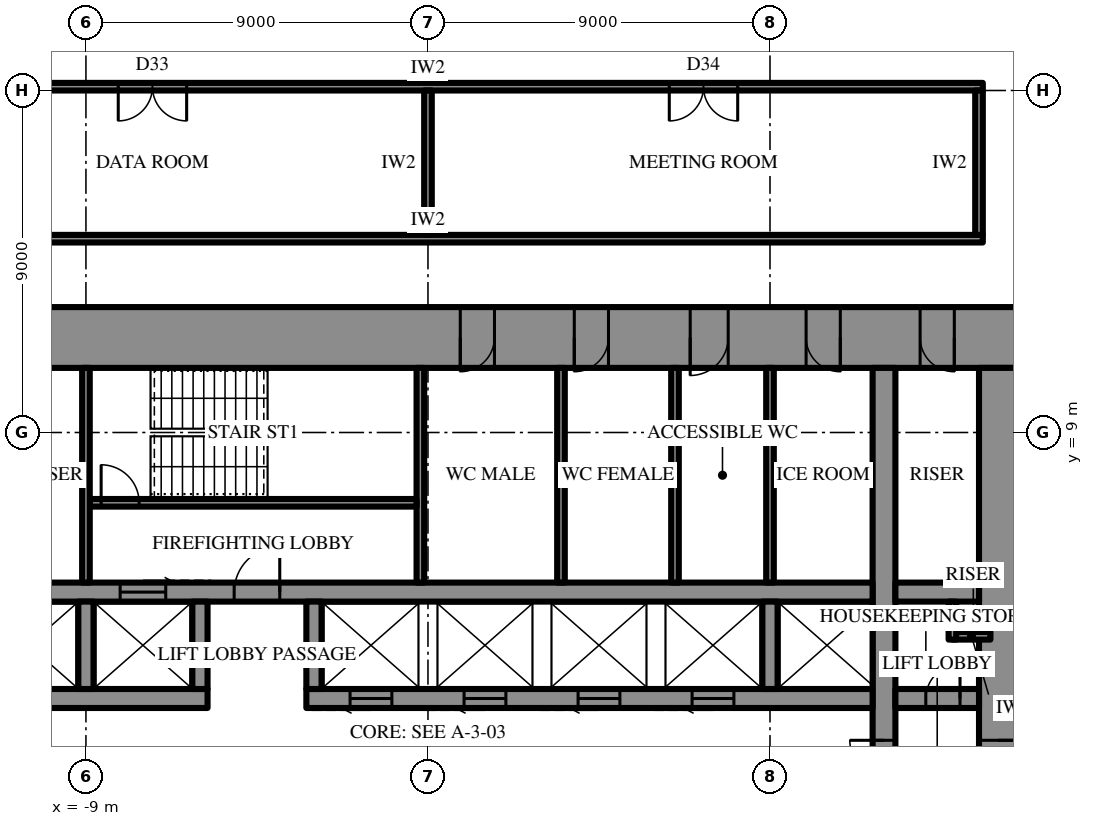
"""IFC4 building model, lengths in metres.
Left out: names, types, materials, properties, quantities, classifications, styles, units other than length and angle.
Written with IfcOpenShell. Run it as: python <this file> out.ifc"""

import sys

from ifc_helpers import new_model, si_unit, direction, frame, frame_2d, origin, place, context, subcontext, project, spatial, rectangle, extrude, element, fill, save


model = new_model("IFC4")
c1 = context("Model", 3, precision=1e-05, world=origin(), true_north=direction((0.0, 1.0)))
c2 = subcontext(c1, "Body", "Model", "MODEL_VIEW")
j1 = project(units=[si_unit("LENGTHUNIT", "METRE"), si_unit("PLANEANGLEUNIT", "RADIAN")], contexts=[c1])
p1 = place(None, origin())
s1 = spatial("IfcSite", under=j1, at=p1, CompositionType="ELEMENT")
p2 = place(p1, origin())
s2 = spatial("IfcBuilding", under=s1, at=p2, CompositionType="ELEMENT")
p3 = place(p2, frame((0.0, 0.0, 278.5)))
s3 = spatial("IfcBuildingStorey", under=s2, at=p3, CompositionType="ELEMENT", Elevation=278.5)
p4 = place(p3, frame((-15.5, 11.5, 0.0), z_axis=(0.0, 0.0, 1.0), x_axis=(1.0, 0.0, 0.0)))
e1 = element("IfcWall", 1, at=p4, inside=s3, PredefinedType="SHEAR", context=c2, shape_type="SweptSolid", body=[
    extrude(rectangle(XDim=31.0, YDim=1.6, at=frame_2d((15.5, 0.0))), origin(), (0.0, 0.0, 1.0), 4.2),
])
p5 = place(p4, frame((16.35, 0.0, 0.0)))
e2 = element("IfcOpeningElement", 2, at=p5, cuts=e1, PredefinedType="OPENING", context=c2, shape_type="SweptSolid", body=[
    extrude(rectangle(XDim=0.9, YDim=2.2, at=frame_2d((0.45, 1.1))), frame((0.0, 0.81, 0.0), z_axis=(0.0, -1.0, 0.0), x_axis=(1.0, 0.0, 0.0)), (0.0, 0.0, 1.0), 1.62),
])
p6 = place(p4, frame((19.35, 0.0, 0.0)))
e3 = element("IfcOpeningElement", 3, at=p6, cuts=e1, PredefinedType="OPENING", context=c2, shape_type="SweptSolid", body=[
    extrude(rectangle(XDim=0.9, YDim=2.2, at=frame_2d((0.45, 1.1))), frame((0.0, 0.81, 0.0), z_axis=(0.0, -1.0, 0.0), x_axis=(1.0, 0.0, 0.0)), (0.0, 0.0, 1.0), 1.62),
])
p7 = place(p4, frame((22.4, 0.0, 0.0)))
e4 = element("IfcOpeningElement", 4, at=p7, cuts=e1, PredefinedType="OPENING", context=c2, shape_type="SweptSolid", body=[
    extrude(rectangle(XDim=1.0, YDim=2.2, at=frame_2d((0.5, 1.1))), frame((0.0, 0.81, 0.0), z_axis=(0.0, -1.0, 0.0), x_axis=(1.0, 0.0, 0.0)), (0.0, 0.0, 1.0), 1.62),
])
p8 = place(p4, frame((1.65, 0.0, 0.0)))
e5 = element("IfcOpeningElement", 5, at=p8, cuts=e1, PredefinedType="OPENING", context=c2, shape_type="SweptSolid", body=[
    extrude(rectangle(XDim=0.9, YDim=2.2, at=frame_2d((0.45, 1.1))), frame((0.0, 0.81, 0.0), z_axis=(0.0, -1.0, 0.0), x_axis=(1.0, 0.0, 0.0)), (0.0, 0.0, 1.0), 1.62),
])
p9 = place(p4, frame((4.65, 0.0, 0.0)))
e6 = element("IfcOpeningElement", 6, at=p9, cuts=e1, PredefinedType="OPENING", context=c2, shape_type="SweptSolid", body=[
    extrude(rectangle(XDim=0.9, YDim=2.2, at=frame_2d((0.45, 1.1))), frame((0.0, 0.81, 0.0), z_axis=(0.0, -1.0, 0.0), x_axis=(1.0, 0.0, 0.0)), (0.0, 0.0, 1.0), 1.62),
])
p10 = place(p4, frame((25.45, 0.0, 0.0)))
e7 = element("IfcOpeningElement", 7, at=p10, cuts=e1, PredefinedType="OPENING", context=c2, shape_type="SweptSolid", body=[
    extrude(rectangle(XDim=0.9, YDim=2.2, at=frame_2d((0.45, 1.1))), frame((0.0, 0.81, 0.0), z_axis=(0.0, -1.0, 0.0), x_axis=(1.0, 0.0, 0.0)), (0.0, 0.0, 1.0), 1.62),
])
p11 = place(p4, frame((28.45, 0.0, 0.0)))
e8 = element("IfcOpeningElement", 8, at=p11, cuts=e1, PredefinedType="OPENING", context=c2, shape_type="SweptSolid", body=[
    extrude(rectangle(XDim=0.9, YDim=2.2, at=frame_2d((0.45, 1.1))), frame((0.0, 0.81, 0.0), z_axis=(0.0, -1.0, 0.0), x_axis=(1.0, 0.0, 0.0)), (0.0, 0.0, 1.0), 1.62),
])
p12 = place(p3, frame((15.0, -10.7, 0.0), z_axis=(0.0, 0.0, 1.0), x_axis=(0.0, 1.0, 0.0)))
e9 = element("IfcWall", 9, at=p12, inside=s3, PredefinedType="SHEAR", context=c2, shape_type="SweptSolid", body=[
    extrude(rectangle(XDim=21.4, YDim=1.0, at=frame_2d((10.7, 0.0))), origin(), (0.0, 0.0, 1.0), 4.2),
])
p13 = place(p12, frame((9.8, 0.0, 0.0)))
e10 = element("IfcOpeningElement", 10, at=p13, cuts=e9, PredefinedType="OPENING", context=c2, shape_type="SweptSolid", body=[
    extrude(rectangle(XDim=1.8, YDim=2.4, at=frame_2d((0.9, 1.2))), frame((0.0, 0.51, 0.0), z_axis=(0.0, -1.0, 0.0), x_axis=(1.0, 0.0, 0.0)), (0.0, 0.0, 1.0), 1.02),
])
p14 = place(p3, frame((12.0, -10.7, 0.0), z_axis=(0.0, 0.0, 1.0), x_axis=(0.0, 1.0, 0.0)))
e11 = element("IfcWall", 11, at=p14, inside=s3, PredefinedType="SHEAR", context=c2, shape_type="SweptSolid", body=[
    extrude(rectangle(XDim=21.4, YDim=0.6, at=frame_2d((10.7, 0.0))), origin(), (0.0, 0.0, 1.0), 4.2),
])
p15 = place(p14, frame((9.8, 0.0, 0.0)))
e12 = element("IfcOpeningElement", 12, at=p15, cuts=e11, PredefinedType="OPENING", context=c2, shape_type="SweptSolid", body=[
    extrude(rectangle(XDim=1.8, YDim=2.4, at=frame_2d((0.9, 1.2))), frame((0.0, 0.31, 0.0), z_axis=(0.0, -1.0, 0.0), x_axis=(1.0, 0.0, 0.0)), (0.0, 0.0, 1.0), 0.62),
])
p16 = place(p3, frame((-11.7, 2.0, 0.0), z_axis=(0.0, 0.0, 1.0), x_axis=(1.0, 0.0, 0.0)))
e13 = element("IfcWall", 13, at=p16, inside=s3, PredefinedType="SHEAR", context=c2, shape_type="SweptSolid", body=[
    extrude(rectangle(XDim=5.9, YDim=0.5, at=frame_2d((2.95, 0.0))), origin(), (0.0, 0.0, 1.0), 4.2),
])
p17 = place(p3, frame((-3.2, 2.0, 0.0), z_axis=(0.0, 0.0, 1.0), x_axis=(1.0, 0.0, 0.0)))
e14 = element("IfcWall", 14, at=p17, inside=s3, PredefinedType="SHEAR", context=c2, shape_type="SweptSolid", body=[
    extrude(rectangle(XDim=14.9, YDim=0.5, at=frame_2d((7.45, 0.0))), origin(), (0.0, 0.0, 1.0), 4.2),
])
p18 = place(p17, frame((1.15, 0.0, 0.0)))
e15 = element("IfcOpeningElement", 15, at=p18, cuts=e14, PredefinedType="OPENING", context=c2, shape_type="SweptSolid", body=[
    extrude(rectangle(XDim=1.1, YDim=2.2, at=frame_2d((0.55, 1.1))), frame((0.0, 0.26, 0.0), z_axis=(0.0, -1.0, 0.0), x_axis=(1.0, 0.0, 0.0)), (0.0, 0.0, 1.0), 0.52),
])
p19 = place(p17, frame((4.15, 0.0, 0.0)))
e16 = element("IfcOpeningElement", 16, at=p19, cuts=e14, PredefinedType="OPENING", context=c2, shape_type="SweptSolid", body=[
    extrude(rectangle(XDim=1.1, YDim=2.2, at=frame_2d((0.55, 1.1))), frame((0.0, 0.26, 0.0), z_axis=(0.0, -1.0, 0.0), x_axis=(1.0, 0.0, 0.0)), (0.0, 0.0, 1.0), 0.52),
])
p20 = place(p17, frame((7.15, 0.0, 0.0)))
e17 = element("IfcOpeningElement", 17, at=p20, cuts=e14, PredefinedType="OPENING", context=c2, shape_type="SweptSolid", body=[
    extrude(rectangle(XDim=1.1, YDim=2.2, at=frame_2d((0.55, 1.1))), frame((0.0, 0.26, 0.0), z_axis=(0.0, -1.0, 0.0), x_axis=(1.0, 0.0, 0.0)), (0.0, 0.0, 1.0), 0.52),
])
p21 = place(p17, frame((10.15, 0.0, 0.0)))
e18 = element("IfcOpeningElement", 18, at=p21, cuts=e14, PredefinedType="OPENING", context=c2, shape_type="SweptSolid", body=[
    extrude(rectangle(XDim=1.1, YDim=2.2, at=frame_2d((0.55, 1.1))), frame((0.0, 0.26, 0.0), z_axis=(0.0, -1.0, 0.0), x_axis=(1.0, 0.0, 0.0)), (0.0, 0.0, 1.0), 0.52),
])
p22 = place(p3, frame((12.3, 2.0, 0.0), z_axis=(0.0, 0.0, 1.0), x_axis=(1.0, 0.0, 0.0)))
e19 = element("IfcWall", 19, at=p22, inside=s3, PredefinedType="SHEAR", context=c2, shape_type="SweptSolid", body=[
    extrude(rectangle(XDim=2.2, YDim=0.5, at=frame_2d((1.1, 0.0))), origin(), (0.0, 0.0, 1.0), 4.2),
])
p23 = place(p22, frame((0.8, 0.0, 0.0)))
e20 = element("IfcOpeningElement", 20, at=p23, cuts=e19, PredefinedType="OPENING", context=c2, shape_type="SweptSolid", body=[
    extrude(rectangle(XDim=0.9, YDim=2.2, at=frame_2d((0.45, 1.1))), frame((0.0, 0.26, 0.0), z_axis=(0.0, -1.0, 0.0), x_axis=(1.0, 0.0, 0.0)), (0.0, 0.0, 1.0), 0.52),
])
p24 = place(p3, frame((-11.7, 4.8, 0.0), z_axis=(0.0, 0.0, 1.0), x_axis=(1.0, 0.0, 0.0)))
e21 = element("IfcWall", 21, at=p24, inside=s3, PredefinedType="SHEAR", context=c2, shape_type="SweptSolid", body=[
    extrude(rectangle(XDim=23.4, YDim=0.5, at=frame_2d((11.7, 0.0))), origin(), (0.0, 0.0, 1.0), 4.2),
])
p25 = place(p24, frame((6.6, 0.0, 0.0)))
e22 = element("IfcOpeningElement", 22, at=p25, cuts=e21, PredefinedType="OPENING", context=c2, shape_type="SweptSolid", body=[
    extrude(rectangle(XDim=1.2, YDim=2.2, at=frame_2d((0.6, 1.1))), frame((0.0, 0.26, 0.0), z_axis=(0.0, -1.0, 0.0), x_axis=(1.0, 0.0, 0.0)), (0.0, 0.0, 1.0), 0.52),
])
p26 = place(p24, frame((3.6, 0.0, 0.0)))
e23 = element("IfcOpeningElement", 23, at=p26, cuts=e21, PredefinedType="OPENING", context=c2, shape_type="SweptSolid", body=[
    extrude(rectangle(XDim=1.2, YDim=2.2, at=frame_2d((0.6, 1.1))), frame((0.0, 0.26, 0.0), z_axis=(0.0, -1.0, 0.0), x_axis=(1.0, 0.0, 0.0)), (0.0, 0.0, 1.0), 0.52),
])
p27 = place(p3, frame((12.3, 4.8, 0.0), z_axis=(0.0, 0.0, 1.0), x_axis=(1.0, 0.0, 0.0)))
e24 = element("IfcWall", 24, at=p27, inside=s3, PredefinedType="SHEAR", context=c2, shape_type="SweptSolid", body=[
    extrude(rectangle(XDim=2.2, YDim=0.5, at=frame_2d((1.1, 0.0))), origin(), (0.0, 0.0, 1.0), 4.2),
])
for number, where, z_axis, x_axis in (
    (25, (-9.0, 2.25, 0.0), (0.0, 0.0, 1.0), (0.0, 1.0, 0.0)),
    (26, (-6.0, 2.25, 0.0), (0.0, 0.0, 1.0), (0.0, 1.0, 0.0)),
    (27, (-3.0, 2.25, 0.0), (0.0, 0.0, 1.0), (0.0, 1.0, 0.0)),
    (28, (9.0, 2.25, 0.0), (0.0, 0.0, 1.0), (0.0, 1.0, 0.0)),
):
    element("IfcWall", number, at=place(p3, frame(where, z_axis=z_axis, x_axis=x_axis)), inside=s3, PredefinedType="SHEAR", context=c2, shape_type="SweptSolid", body=[
        extrude(rectangle(XDim=2.3, YDim=0.4, at=frame_2d((1.15, 0.0))), origin(), (0.0, 0.0, 1.0), 4.2),
    ])
p28 = place(p3, frame((-0.2, 5.05, 0.0), z_axis=(0.0, 0.0, 1.0), x_axis=(0.0, 1.0, 0.0)))
e29 = element("IfcWall", 29, at=p28, inside=s3, PredefinedType="SHEAR", context=c2, shape_type="SweptSolid", body=[
    extrude(rectangle(XDim=5.65, YDim=0.2, at=frame_2d((2.825, 0.0))), origin(), (0.0, 0.0, 1.0), 4.2),
])
p29 = place(p3, frame((-8.9, 7.15, 0.0), z_axis=(0.0, 0.0, 1.0), x_axis=(1.0, 0.0, 0.0)))
e30 = element("IfcWall", 30, at=p29, inside=s3, PredefinedType="SHEAR", context=c2, shape_type="SweptSolid", body=[
    extrude(rectangle(XDim=8.6, YDim=0.2, at=frame_2d((4.3, 0.0))), origin(), (0.0, 0.0, 1.0), 4.2),
])
p30 = place(p29, frame((0.3, 0.0, 0.0)))
e31 = element("IfcOpeningElement", 31, at=p30, cuts=e30, PredefinedType="OPENING", context=c2, shape_type="SweptSolid", body=[
    extrude(rectangle(XDim=1.0, YDim=2.2, at=frame_2d((0.5, 1.1))), frame((0.0, 0.11, 0.0), z_axis=(0.0, -1.0, 0.0), x_axis=(1.0, 0.0, 0.0)), (0.0, 0.0, 1.0), 0.22),
])
for number, where, z_axis, x_axis in (
    (32, (-9.0, 5.05, 0.0), (0.0, 0.0, 1.0), (0.0, 1.0, 0.0)),
    (33, (9.0, 5.05, 0.0), (0.0, 0.0, 1.0), (0.0, 1.0, 0.0)),
    (34, (3.5, 5.05, 0.0), (0.0, 0.0, 1.0), (0.0, 1.0, 0.0)),
    (35, (6.5, 5.05, 0.0), (0.0, 0.0, 1.0), (0.0, 1.0, 0.0)),
):
    element("IfcWall", number, at=place(p3, frame(where, z_axis=z_axis, x_axis=x_axis)), inside=s3, PredefinedType="PARTITIONING", context=c2, shape_type="SweptSolid", body=[
        extrude(rectangle(XDim=5.65, YDim=0.2, at=frame_2d((2.825, 0.0))), origin(), (0.0, 0.0, 1.0), 4.0),
    ])
for number, where, z_axis, x_axis in (
    (36, (13.8, 3.65, 0.0), (0.0, 0.0, 1.0), (1.0, 0.0, 0.0)),
    (37, (13.8, 3.55, 0.0), (0.0, 0.0, 1.0), (0.0, 1.0, 0.0)),
):
    element("IfcWall", number, at=place(p3, frame(where, z_axis=z_axis, x_axis=x_axis)), inside=s3, PredefinedType="PARTITIONING", context=c2, shape_type="SweptSolid", body=[
        extrude(rectangle(XDim=1.0, YDim=0.2, at=frame_2d((0.5, 0.0))), origin(), (0.0, 0.0, 1.0), 4.0),
    ])
p31 = place(p3, frame((-14.6, 14.1, 0.0), z_axis=(0.0, 0.0, 1.0), x_axis=(1.0, 0.0, 0.0)))
e38 = element("IfcWall", 38, at=p31, inside=s3, PredefinedType="PARTITIONING", context=c2, shape_type="SweptSolid", body=[
    extrude(rectangle(XDim=29.2, YDim=0.2, at=frame_2d((14.6, 0.0))), origin(), (0.0, 0.0, 1.0), 4.0),
])
p32 = place(p3, frame((-14.6, 18.1, 0.0), z_axis=(0.0, 0.0, 1.0), x_axis=(1.0, 0.0, 0.0)))
e39 = element("IfcWall", 39, at=p32, inside=s3, PredefinedType="PARTITIONING", context=c2, shape_type="SweptSolid", body=[
    extrude(rectangle(XDim=29.2, YDim=0.2, at=frame_2d((14.6, 0.0))), origin(), (0.0, 0.0, 1.0), 4.0),
])
p33 = place(p32, frame((6.45, 0.0, 0.0)))
e40 = element("IfcOpeningElement", 40, at=p33, cuts=e39, PredefinedType="OPENING", context=c2, shape_type="SweptSolid", body=[
    extrude(rectangle(XDim=1.8, YDim=2.4, at=frame_2d((0.9, 1.2))), frame((0.0, 0.11, 0.0), z_axis=(0.0, -1.0, 0.0), x_axis=(1.0, 0.0, 0.0)), (0.0, 0.0, 1.0), 0.22),
])
p34 = place(p32, frame((20.95, 0.0, 0.0)))
e41 = element("IfcOpeningElement", 41, at=p34, cuts=e39, PredefinedType="OPENING", context=c2, shape_type="SweptSolid", body=[
    extrude(rectangle(XDim=1.8, YDim=2.4, at=frame_2d((0.9, 1.2))), frame((0.0, 0.11, 0.0), z_axis=(0.0, -1.0, 0.0), x_axis=(1.0, 0.0, 0.0)), (0.0, 0.0, 1.0), 0.22),
])
p35 = place(p3, frame((0.0, 14.2, 0.0), z_axis=(0.0, 0.0, 1.0), x_axis=(0.0, 1.0, 0.0)))
e42 = element("IfcWall", 42, at=p35, inside=s3, PredefinedType="PARTITIONING", context=c2, shape_type="SweptSolid", body=[
    extrude(rectangle(XDim=3.8, YDim=0.2, at=frame_2d((1.9, 0.0))), origin(), (0.0, 0.0, 1.0), 2.992),
])
p36 = place(p3, frame((14.5, 14.2, 0.0), z_axis=(0.0, 0.0, 1.0), x_axis=(0.0, 1.0, 0.0)))
e43 = element("IfcWall", 43, at=p36, inside=s3, PredefinedType="PARTITIONING", context=c2, shape_type="SweptSolid", body=[
    extrude(rectangle(XDim=3.8, YDim=0.2, at=frame_2d((1.9, 0.0))), origin(), (0.0, 0.0, 1.0), 4.0),
])
p37 = place(p13, frame((1.8, 0.0, 0.0), z_axis=(0.0, 0.0, 1.0), x_axis=(-1.0, 0.0, 0.0)))
e44 = element("IfcDoor", 44, at=p37, inside=s3, OperationType="DOUBLE_DOOR_SINGLE_SWING", PredefinedType="DOOR", context=c2, shape_type="SweptSolid", body=[
    extrude(rectangle(XDim=1.8, YDim=2.4, at=frame_2d((0.9, 1.2))), frame((0.0, 0.025, 0.0), z_axis=(0.0, -1.0, 0.0), x_axis=(1.0, 0.0, 0.0)), (0.0, 0.0, 1.0), 0.05),
])
fill(e10, e44)
p38 = place(p25, origin())
e45 = element("IfcDoor", 45, at=p38, inside=s3, OperationType="SINGLE_SWING_LEFT", PredefinedType="DOOR", context=c2, shape_type="SweptSolid", body=[
    extrude(rectangle(XDim=1.2, YDim=2.2, at=frame_2d((0.6, 1.1))), frame((0.0, 0.025, 0.0), z_axis=(0.0, -1.0, 0.0), x_axis=(1.0, 0.0, 0.0)), (0.0, 0.0, 1.0), 0.05),
])
fill(e22, e45)
p39 = place(p30, origin())
e46 = element("IfcDoor", 46, at=p39, inside=s3, OperationType="SINGLE_SWING_RIGHT", PredefinedType="DOOR", context=c2, shape_type="SweptSolid", body=[
    extrude(rectangle(XDim=1.0, YDim=2.2, at=frame_2d((0.5, 1.1))), frame((0.0, 0.025, 0.0), z_axis=(0.0, -1.0, 0.0), x_axis=(1.0, 0.0, 0.0)), (0.0, 0.0, 1.0), 0.05),
])
fill(e31, e46)
p40 = place(p5, frame((0.9, 0.0, 0.0), z_axis=(0.0, 0.0, 1.0), x_axis=(-1.0, 0.0, 0.0)))
e47 = element("IfcDoor", 47, at=p40, inside=s3, OperationType="SINGLE_SWING_LEFT", PredefinedType="DOOR", context=c2, shape_type="SweptSolid", body=[
    extrude(rectangle(XDim=0.9, YDim=2.2, at=frame_2d((0.45, 1.1))), frame((0.0, 0.025, 0.0), z_axis=(0.0, -1.0, 0.0), x_axis=(1.0, 0.0, 0.0)), (0.0, 0.0, 1.0), 0.05),
])
fill(e2, e47)
p41 = place(p6, frame((0.9, 0.0, 0.0), z_axis=(0.0, 0.0, 1.0), x_axis=(-1.0, 0.0, 0.0)))
e48 = element("IfcDoor", 48, at=p41, inside=s3, OperationType="SINGLE_SWING_LEFT", PredefinedType="DOOR", context=c2, shape_type="SweptSolid", body=[
    extrude(rectangle(XDim=0.9, YDim=2.2, at=frame_2d((0.45, 1.1))), frame((0.0, 0.025, 0.0), z_axis=(0.0, -1.0, 0.0), x_axis=(1.0, 0.0, 0.0)), (0.0, 0.0, 1.0), 0.05),
])
fill(e3, e48)
p42 = place(p7, frame((1.0, 0.0, 0.0), z_axis=(0.0, 0.0, 1.0), x_axis=(-1.0, 0.0, 0.0)))
e49 = element("IfcDoor", 49, at=p42, inside=s3, OperationType="SINGLE_SWING_LEFT", PredefinedType="DOOR", context=c2, shape_type="SweptSolid", body=[
    extrude(rectangle(XDim=1.0, YDim=2.2, at=frame_2d((0.5, 1.1))), frame((0.0, 0.025, 0.0), z_axis=(0.0, -1.0, 0.0), x_axis=(1.0, 0.0, 0.0)), (0.0, 0.0, 1.0), 0.05),
])
fill(e4, e49)
p43 = place(p10, frame((0.9, 0.0, 0.0), z_axis=(0.0, 0.0, 1.0), x_axis=(-1.0, 0.0, 0.0)))
e50 = element("IfcDoor", 50, at=p43, inside=s3, OperationType="SINGLE_SWING_RIGHT", PredefinedType="DOOR", context=c2, shape_type="SweptSolid", body=[
    extrude(rectangle(XDim=0.9, YDim=2.2, at=frame_2d((0.45, 1.1))), frame((0.0, 0.025, 0.0), z_axis=(0.0, -1.0, 0.0), x_axis=(1.0, 0.0, 0.0)), (0.0, 0.0, 1.0), 0.05),
])
fill(e7, e50)
p44 = place(p11, frame((0.9, 0.0, 0.0), z_axis=(0.0, 0.0, 1.0), x_axis=(-1.0, 0.0, 0.0)))
e51 = element("IfcDoor", 51, at=p44, inside=s3, OperationType="SINGLE_SWING_RIGHT", PredefinedType="DOOR", context=c2, shape_type="SweptSolid", body=[
    extrude(rectangle(XDim=0.9, YDim=2.2, at=frame_2d((0.45, 1.1))), frame((0.0, 0.025, 0.0), z_axis=(0.0, -1.0, 0.0), x_axis=(1.0, 0.0, 0.0)), (0.0, 0.0, 1.0), 0.05),
])
fill(e8, e51)
p45 = place(p23, origin())
e52 = element("IfcDoor", 52, at=p45, inside=s3, OperationType="SINGLE_SWING_LEFT", PredefinedType="DOOR", context=c2, shape_type="SweptSolid", body=[
    extrude(rectangle(XDim=0.9, YDim=2.2, at=frame_2d((0.45, 1.1))), frame((0.0, 0.025, 0.0), z_axis=(0.0, -1.0, 0.0), x_axis=(1.0, 0.0, 0.0)), (0.0, 0.0, 1.0), 0.05),
])
fill(e20, e52)
p46 = place(p15, origin())
e53 = element("IfcDoor", 53, at=p46, inside=s3, OperationType="DOUBLE_DOOR_SINGLE_SWING", PredefinedType="DOOR", context=c2, shape_type="SweptSolid", body=[
    extrude(rectangle(XDim=1.8, YDim=2.4, at=frame_2d((0.9, 1.2))), frame((0.0, 0.025, 0.0), z_axis=(0.0, -1.0, 0.0), x_axis=(1.0, 0.0, 0.0)), (0.0, 0.0, 1.0), 0.05),
])
fill(e12, e53)
p47 = place(p26, origin())
e54 = element("IfcDoor", 54, at=p47, inside=s3, OperationType="SLIDING_TO_LEFT", PredefinedType="DOOR", context=c2, shape_type="SweptSolid", body=[
    extrude(rectangle(XDim=1.2, YDim=2.2, at=frame_2d((0.6, 1.1))), frame((0.0, 0.025, 0.0), z_axis=(0.0, -1.0, 0.0), x_axis=(1.0, 0.0, 0.0)), (0.0, 0.0, 1.0), 0.05),
])
fill(e23, e54)
p48 = place(p18, frame((1.1, 0.0, 0.0), z_axis=(0.0, 0.0, 1.0), x_axis=(-1.0, 0.0, 0.0)))
e55 = element("IfcDoor", 55, at=p48, inside=s3, OperationType="SLIDING_TO_LEFT", PredefinedType="DOOR", context=c2, shape_type="SweptSolid", body=[
    extrude(rectangle(XDim=1.1, YDim=2.2, at=frame_2d((0.55, 1.1))), frame((0.0, 0.025, 0.0), z_axis=(0.0, -1.0, 0.0), x_axis=(1.0, 0.0, 0.0)), (0.0, 0.0, 1.0), 0.05),
])
fill(e15, e55)
p49 = place(p19, frame((1.1, 0.0, 0.0), z_axis=(0.0, 0.0, 1.0), x_axis=(-1.0, 0.0, 0.0)))
e56 = element("IfcDoor", 56, at=p49, inside=s3, OperationType="SLIDING_TO_LEFT", PredefinedType="DOOR", context=c2, shape_type="SweptSolid", body=[
    extrude(rectangle(XDim=1.1, YDim=2.2, at=frame_2d((0.55, 1.1))), frame((0.0, 0.025, 0.0), z_axis=(0.0, -1.0, 0.0), x_axis=(1.0, 0.0, 0.0)), (0.0, 0.0, 1.0), 0.05),
])
fill(e16, e56)
p50 = place(p20, frame((1.1, 0.0, 0.0), z_axis=(0.0, 0.0, 1.0), x_axis=(-1.0, 0.0, 0.0)))
e57 = element("IfcDoor", 57, at=p50, inside=s3, OperationType="SLIDING_TO_LEFT", PredefinedType="DOOR", context=c2, shape_type="SweptSolid", body=[
    extrude(rectangle(XDim=1.1, YDim=2.2, at=frame_2d((0.55, 1.1))), frame((0.0, 0.025, 0.0), z_axis=(0.0, -1.0, 0.0), x_axis=(1.0, 0.0, 0.0)), (0.0, 0.0, 1.0), 0.05),
])
fill(e17, e57)
p51 = place(p21, frame((1.1, 0.0, 0.0), z_axis=(0.0, 0.0, 1.0), x_axis=(-1.0, 0.0, 0.0)))
e58 = element("IfcDoor", 58, at=p51, inside=s3, OperationType="SLIDING_TO_LEFT", PredefinedType="DOOR", context=c2, shape_type="SweptSolid", body=[
    extrude(rectangle(XDim=1.1, YDim=2.2, at=frame_2d((0.55, 1.1))), frame((0.0, 0.025, 0.0), z_axis=(0.0, -1.0, 0.0), x_axis=(1.0, 0.0, 0.0)), (0.0, 0.0, 1.0), 0.05),
])
fill(e18, e58)
p52 = place(p33, frame((1.8, 0.0, 0.0), z_axis=(0.0, 0.0, 1.0), x_axis=(-1.0, 0.0, 0.0)))
e59 = element("IfcDoor", 59, at=p52, inside=s3, OperationType="DOUBLE_DOOR_SINGLE_SWING", PredefinedType="DOOR", context=c2, shape_type="SweptSolid", body=[
    extrude(rectangle(XDim=1.8, YDim=2.4, at=frame_2d((0.9, 1.2))), frame((0.0, 0.025, 0.0), z_axis=(0.0, -1.0, 0.0), x_axis=(1.0, 0.0, 0.0)), (0.0, 0.0, 1.0), 0.05),
])
fill(e40, e59)
p53 = place(p34, frame((1.8, 0.0, 0.0), z_axis=(0.0, 0.0, 1.0), x_axis=(-1.0, 0.0, 0.0)))
e60 = element("IfcDoor", 60, at=p53, inside=s3, OperationType="DOUBLE_DOOR_SINGLE_SWING", PredefinedType="DOOR", context=c2, shape_type="SweptSolid", body=[
    extrude(rectangle(XDim=1.8, YDim=2.4, at=frame_2d((0.9, 1.2))), frame((0.0, 0.025, 0.0), z_axis=(0.0, -1.0, 0.0), x_axis=(1.0, 0.0, 0.0)), (0.0, 0.0, 1.0), 0.05),
])
fill(e41, e60)
save(model, sys.argv[1])
